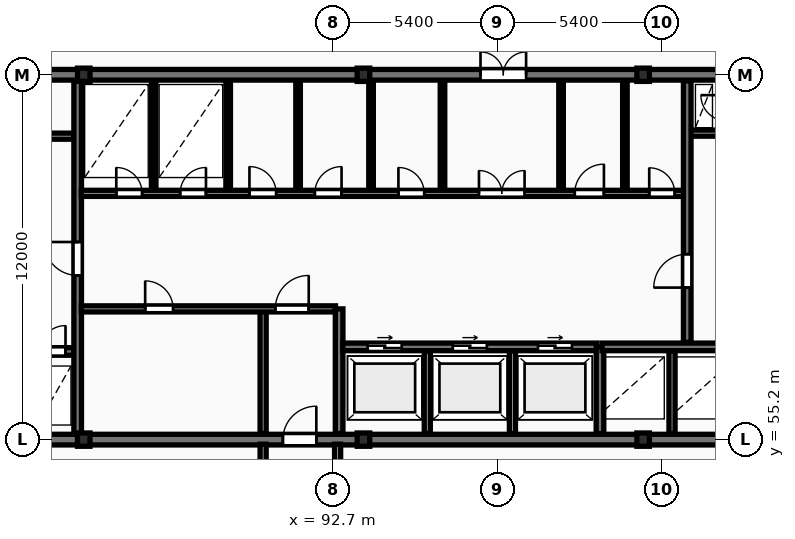
"""IFC4 building model, lengths in metres.
Left out: names, types, materials, properties, quantities, classifications, styles, units other than length and angle.
Written with IfcOpenShell. Run it as: python <this file> out.ifc"""

import sys

from ifc_helpers import new_model, si_unit, direction, frame, frame_2d, origin, origin_2d, place, context, subcontext, project, spatial, rectangle, i_section, extrude, element, fill, save


model = new_model("IFC4")
c1 = context("Model", 3, precision=1e-05, world=origin(), true_north=direction((0.0, 1.0)))
c2 = subcontext(c1, "Body", "Model", "MODEL_VIEW")
j1 = project(units=[si_unit("LENGTHUNIT", "METRE"), si_unit("PLANEANGLEUNIT", "RADIAN")], contexts=[c1])
p1 = place(None, origin())
s1 = spatial("IfcSite", under=j1, at=p1, CompositionType="ELEMENT")
p2 = place(p1, origin())
s2 = spatial("IfcBuilding", under=s1, at=p2, CompositionType="ELEMENT")
p3 = place(p2, frame((0.0, 0.0, 150.1)))
s3 = spatial("IfcBuildingStorey", under=s2, at=p3, CompositionType="ELEMENT", Elevation=150.1)
for number, where, z_axis, x_axis in (
    (1, (84.5, 55.2, 0.0), (0.0, 0.0, 1.0), (1.0, 0.0, 0.0)),
    (2, (84.5, 67.2, 0.0), (0.0, 0.0, 1.0), (1.0, 0.0, 0.0)),
    (3, (93.7, 55.2, 0.0), (0.0, 0.0, 1.0), (1.0, 0.0, 0.0)),
    (4, (93.7, 67.2, 0.0), (0.0, 0.0, 1.0), (1.0, 0.0, 0.0)),
    (5, (102.9, 55.2, 0.0), (0.0, 0.0, 1.0), (1.0, 0.0, 0.0)),
    (6, (102.9, 67.2, 0.0), (0.0, 0.0, 1.0), (1.0, 0.0, 0.0)),
):
    element("IfcColumn", number, at=place(p3, frame(where, z_axis=z_axis, x_axis=x_axis)), inside=s3, PredefinedType="COLUMN", context=c2, shape_type="SweptSolid", body=[
        extrude(i_section(OverallWidth=0.412, OverallDepth=0.437, WebThickness=0.036, FlangeThickness=0.052, FilletRadius=0.015, at=origin_2d()), origin(), (0.0, 0.0, 1.0), 3.6),
    ])
p4 = place(p3, frame((75.95, 55.2, 0.0), z_axis=(0.0, 0.0, 1.0), x_axis=(1.0, 0.0, 0.0)))
e7 = element("IfcWall", 7, at=p4, inside=s3, PredefinedType="SHEAR", context=c2, shape_type="SweptSolid", body=[
    extrude(rectangle(XDim=36.3, YDim=0.35, at=frame_2d((18.15, 0.0))), origin(), (0.0, 0.0, 1.0), 3.6),
])
p5 = place(p4, frame((15.1, 0.0, 0.0)))
e8 = element("IfcOpeningElement", 8, at=p5, cuts=e7, PredefinedType="OPENING", context=c2, shape_type="SweptSolid", body=[
    extrude(rectangle(XDim=1.1, YDim=2.1, at=frame_2d((0.55, 1.05))), frame((0.0, 0.185, 0.0), z_axis=(0.0, -1.0, 0.0), x_axis=(1.0, 0.0, 0.0)), (0.0, 0.0, 1.0), 0.37),
])
p6 = place(p3, frame((75.95, 67.2, 0.0), z_axis=(0.0, 0.0, 1.0), x_axis=(1.0, 0.0, 0.0)))
e9 = element("IfcWall", 9, at=p6, inside=s3, PredefinedType="SHEAR", context=c2, shape_type="SweptSolid", body=[
    extrude(rectangle(XDim=36.3, YDim=0.35, at=frame_2d((18.15, 0.0))), origin(), (0.0, 0.0, 1.0), 3.6),
])
p7 = place(p6, frame((5.25, 0.0, 0.0)))
e10 = element("IfcOpeningElement", 10, at=p7, cuts=e9, PredefinedType="OPENING", context=c2, shape_type="SweptSolid", body=[
    extrude(rectangle(XDim=1.0, YDim=2.15, at=frame_2d((0.5, 1.075))), frame((0.0, 0.185, 0.0), z_axis=(0.0, -1.0, 0.0), x_axis=(1.0, 0.0, 0.0)), (0.0, 0.0, 1.0), 0.37),
])
p8 = place(p6, frame((21.6, 0.0, 0.0)))
e11 = element("IfcOpeningElement", 11, at=p8, cuts=e9, PredefinedType="OPENING", context=c2, shape_type="SweptSolid", body=[
    extrude(rectangle(XDim=1.5, YDim=2.2, at=frame_2d((0.75, 1.1))), frame((0.0, 0.185, 0.0), z_axis=(0.0, -1.0, 0.0), x_axis=(1.0, 0.0, 0.0)), (0.0, 0.0, 1.0), 0.37),
])
p9 = place(p6, frame((30.45, 0.0, 0.0)))
e12 = element("IfcOpeningElement", 12, at=p9, cuts=e9, PredefinedType="OPENING", context=c2, shape_type="SweptSolid", body=[
    extrude(rectangle(XDim=1.0, YDim=2.15, at=frame_2d((0.5, 1.075))), frame((0.0, 0.185, 0.0), z_axis=(0.0, -1.0, 0.0), x_axis=(1.0, 0.0, 0.0)), (0.0, 0.0, 1.0), 0.37),
])
p10 = place(p3, frame((79.79, 58.1, 0.0), z_axis=(0.0, 0.0, 1.0), x_axis=(1.0, 0.0, 0.0)))
e13 = element("IfcWall", 13, at=p10, inside=s3, PredefinedType="SHEAR", context=c2, shape_type="SweptSolid", body=[
    extrude(rectangle(XDim=4.39, YDim=0.25, at=frame_2d((2.195, 0.0))), origin(), (0.0, 0.0, 1.0), 3.6),
])
p11 = place(p10, frame((1.05, 0.0, 0.0)))
e14 = element("IfcOpeningElement", 14, at=p11, cuts=e13, PredefinedType="OPENING", context=c2, shape_type="SweptSolid", body=[
    extrude(rectangle(XDim=1.12, YDim=2.12, at=frame_2d((0.56, 1.06))), frame((0.0, 0.135, 0.0), z_axis=(0.0, -1.0, 0.0), x_axis=(1.0, 0.0, 0.0)), (0.0, 0.0, 1.0), 0.27),
])
p12 = place(p10, frame((3.26, 0.0, 0.0)))
e15 = element("IfcOpeningElement", 15, at=p12, cuts=e13, PredefinedType="OPENING", context=c2, shape_type="SweptSolid", body=[
    extrude(rectangle(XDim=0.85, YDim=2.05, at=frame_2d((0.425, 1.025))), frame((0.0, 0.135, 0.0), z_axis=(0.0, -1.0, 0.0), x_axis=(1.0, 0.0, 0.0)), (0.0, 0.0, 1.0), 0.27),
])
p13 = place(p3, frame((79.79, 65.18, 0.0), z_axis=(0.0, 0.0, 1.0), x_axis=(1.0, 0.0, 0.0)))
e16 = element("IfcWall", 16, at=p13, inside=s3, PredefinedType="PARTITIONING", context=c2, shape_type="SweptSolid", body=[
    extrude(rectangle(XDim=4.39, YDim=0.2, at=frame_2d((2.195, 0.0))), origin(), (0.0, 0.0, 1.0), 3.31),
])
p14 = place(p13, frame((1.5, 0.0, 0.0)))
e17 = element("IfcOpeningElement", 17, at=p14, cuts=e16, PredefinedType="OPENING", context=c2, shape_type="SweptSolid", body=[
    extrude(rectangle(XDim=1.1, YDim=2.1, at=frame_2d((0.55, 1.05))), frame((0.0, 0.11, 0.0), z_axis=(0.0, -1.0, 0.0), x_axis=(1.0, 0.0, 0.0)), (0.0, 0.0, 1.0), 0.22),
])
p15 = place(p3, frame((84.3, 55.4, 0.0), z_axis=(0.0, 0.0, 1.0), x_axis=(0.0, 1.0, 0.0)))
e18 = element("IfcWall", 18, at=p15, inside=s3, PredefinedType="SHEAR", context=c2, shape_type="SweptSolid", body=[
    extrude(rectangle(XDim=11.6, YDim=0.25, at=frame_2d((5.8, 0.0))), origin(), (0.0, 0.0, 1.0), 3.6),
])
p16 = place(p15, frame((5.2, 0.0, 0.0)))
e19 = element("IfcOpeningElement", 19, at=p16, cuts=e18, PredefinedType="OPENING", context=c2, shape_type="SweptSolid", body=[
    extrude(rectangle(XDim=1.1, YDim=2.1, at=frame_2d((0.55, 1.05))), frame((0.0, 0.135, 0.0), z_axis=(0.0, -1.0, 0.0), x_axis=(1.0, 0.0, 0.0)), (0.0, 0.0, 1.0), 0.27),
])
p17 = place(p3, frame((90.4, 55.4, 0.0), z_axis=(0.0, 0.0, 1.0), x_axis=(0.0, 1.0, 0.0)))
e20 = element("IfcWall", 20, at=p17, inside=s3, PredefinedType="PARTITIONING", context=c2, shape_type="SweptSolid", body=[
    extrude(rectangle(XDim=4.1, YDim=0.2, at=frame_2d((2.05, 0.0))), origin(), (0.0, 0.0, 1.0), 3.31),
])
p18 = place(p3, frame((84.42, 59.5, 0.0), z_axis=(0.0, 0.0, 1.0), x_axis=(1.0, 0.0, 0.0)))
e21 = element("IfcWall", 21, at=p18, inside=s3, PredefinedType="PARTITIONING", context=c2, shape_type="SweptSolid", body=[
    extrude(rectangle(XDim=8.36, YDim=0.2, at=frame_2d((4.18, 0.0))), origin(), (0.0, 0.0, 1.0), 3.31),
])
p19 = place(p18, frame((2.1, 0.0, 0.0)))
e22 = element("IfcOpeningElement", 22, at=p19, cuts=e21, PredefinedType="OPENING", context=c2, shape_type="SweptSolid", body=[
    extrude(rectangle(XDim=0.92, YDim=2.08, at=frame_2d((0.46, 1.04))), frame((0.0, 0.11, 0.0), z_axis=(0.0, -1.0, 0.0), x_axis=(1.0, 0.0, 0.0)), (0.0, 0.0, 1.0), 0.22),
])
p20 = place(p18, frame((6.38, 0.0, 0.0)))
e23 = element("IfcOpeningElement", 23, at=p20, cuts=e21, PredefinedType="OPENING", context=c2, shape_type="SweptSolid", body=[
    extrude(rectangle(XDim=1.1, YDim=2.1, at=frame_2d((0.55, 1.05))), frame((0.0, 0.11, 0.0), z_axis=(0.0, -1.0, 0.0), x_axis=(1.0, 0.0, 0.0)), (0.0, 0.0, 1.0), 0.22),
])
p21 = place(p3, frame((92.9, 55.4, 0.0), z_axis=(0.0, 0.0, 1.0), x_axis=(0.0, 1.0, 0.0)))
e24 = element("IfcWall", 24, at=p21, inside=s3, PredefinedType="SHEAR", context=c2, shape_type="SweptSolid", body=[
    extrude(rectangle(XDim=4.1, YDim=0.25, at=frame_2d((2.05, 0.0))), origin(), (0.0, 0.0, 1.0), 3.6),
])
for number, where, z_axis, x_axis in (
    (25, (95.8, 55.4, 0.0), (0.0, 0.0, 1.0), (0.0, 1.0, 0.0)),
    (26, (98.6, 55.4, 0.0), (0.0, 0.0, 1.0), (0.0, 1.0, 0.0)),
):
    element("IfcWall", number, at=place(p3, frame(where, z_axis=z_axis, x_axis=x_axis)), inside=s3, PredefinedType="PARTITIONING", context=c2, shape_type="SweptSolid", body=[
        extrude(rectangle(XDim=2.72, YDim=0.2, at=frame_2d((1.36, 0.0))), origin(), (0.0, 0.0, 1.0), 3.31),
    ])
p22 = place(p3, frame((93.02, 58.25, 0.0), z_axis=(0.0, 0.0, 1.0), x_axis=(1.0, 0.0, 0.0)))
e27 = element("IfcWall", 27, at=p22, inside=s3, PredefinedType="SHEAR", context=c2, shape_type="SweptSolid", body=[
    extrude(rectangle(XDim=8.36, YDim=0.25, at=frame_2d((4.18, 0.0))), origin(), (0.0, 0.0, 1.0), 3.6),
])
p23 = place(p22, frame((0.82, 0.0, 0.0)))
e28 = element("IfcOpeningElement", 28, at=p23, cuts=e27, PredefinedType="OPENING", context=c2, shape_type="SweptSolid", body=[
    extrude(rectangle(XDim=1.12, YDim=2.12, at=frame_2d((0.56, 1.06))), frame((0.0, 0.135, 0.0), z_axis=(0.0, -1.0, 0.0), x_axis=(1.0, 0.0, 0.0)), (0.0, 0.0, 1.0), 0.27),
])
p24 = place(p22, frame((3.62, 0.0, 0.0)))
e29 = element("IfcOpeningElement", 29, at=p24, cuts=e27, PredefinedType="OPENING", context=c2, shape_type="SweptSolid", body=[
    extrude(rectangle(XDim=1.12, YDim=2.12, at=frame_2d((0.56, 1.06))), frame((0.0, 0.135, 0.0), z_axis=(0.0, -1.0, 0.0), x_axis=(1.0, 0.0, 0.0)), (0.0, 0.0, 1.0), 0.27),
])
p25 = place(p22, frame((6.42, 0.0, 0.0)))
e30 = element("IfcOpeningElement", 30, at=p25, cuts=e27, PredefinedType="OPENING", context=c2, shape_type="SweptSolid", body=[
    extrude(rectangle(XDim=1.12, YDim=2.12, at=frame_2d((0.56, 1.06))), frame((0.0, 0.135, 0.0), z_axis=(0.0, -1.0, 0.0), x_axis=(1.0, 0.0, 0.0)), (0.0, 0.0, 1.0), 0.27),
])
p26 = place(p3, frame((101.48, 55.4, 0.0), z_axis=(0.0, 0.0, 1.0), x_axis=(0.0, 1.0, 0.0)))
e31 = element("IfcWall", 31, at=p26, inside=s3, PredefinedType="SHEAR", context=c2, shape_type="SweptSolid", body=[
    extrude(rectangle(XDim=2.85, YDim=0.25, at=frame_2d((1.425, 0.0))), origin(), (0.0, 0.0, 1.0), 3.6),
])
p27 = place(p3, frame((103.85, 55.4, 0.0), z_axis=(0.0, 0.0, 1.0), x_axis=(0.0, 1.0, 0.0)))
e32 = element("IfcWall", 32, at=p27, inside=s3, PredefinedType="PARTITIONING", context=c2, shape_type="SweptSolid", body=[
    extrude(rectangle(XDim=2.72, YDim=0.2, at=frame_2d((1.36, 0.0))), origin(), (0.0, 0.0, 1.0), 3.31),
])
p28 = place(p3, frame((101.55, 58.25, 0.0), z_axis=(0.0, 0.0, 1.0), x_axis=(1.0, 0.0, 0.0)))
e33 = element("IfcWall", 33, at=p28, inside=s3, PredefinedType="SHEAR", context=c2, shape_type="SweptSolid", body=[
    extrude(rectangle(XDim=4.6, YDim=0.25, at=frame_2d((2.3, 0.0))), origin(), (0.0, 0.0, 1.0), 3.6),
])
for number, where, z_axis, x_axis in (
    (34, (86.8, 63.4, 0.0), (0.0, 0.0, 1.0), (0.0, 1.0, 0.0)),
    (35, (89.25, 63.4, 0.0), (0.0, 0.0, 1.0), (0.0, 1.0, 0.0)),
    (36, (91.55, 63.4, 0.0), (0.0, 0.0, 1.0), (0.0, 1.0, 0.0)),
):
    element("IfcWall", number, at=place(p3, frame(where, z_axis=z_axis, x_axis=x_axis)), inside=s3, PredefinedType="PARTITIONING", context=c2, shape_type="SweptSolid", body=[
        extrude(rectangle(XDim=3.6, YDim=0.15, at=frame_2d((1.8, 0.0))), origin(), (0.0, 0.0, 1.0), 3.31),
    ])
p29 = place(p3, frame((93.95, 63.4, 0.0), z_axis=(0.0, 0.0, 1.0), x_axis=(0.0, 1.0, 0.0)))
e37 = element("IfcWall", 37, at=p29, inside=s3, PredefinedType="PARTITIONING", context=c2, shape_type="SweptSolid", body=[
    extrude(rectangle(XDim=3.6, YDim=0.15, at=frame_2d((1.8, 0.0))), origin(), (0.0, 0.0, 1.0), 2.617),
])
for number, where, z_axis, x_axis in (
    (38, (102.3, 63.4, 0.0), (0.0, 0.0, 1.0), (0.0, 1.0, 0.0)),
    (39, (96.3, 63.4, 0.0), (0.0, 0.0, 1.0), (0.0, 1.0, 0.0)),
    (40, (100.2, 63.4, 0.0), (0.0, 0.0, 1.0), (0.0, 1.0, 0.0)),
):
    element("IfcWall", number, at=place(p3, frame(where, z_axis=z_axis, x_axis=x_axis)), inside=s3, PredefinedType="PARTITIONING", context=c2, shape_type="SweptSolid", body=[
        extrude(rectangle(XDim=3.6, YDim=0.15, at=frame_2d((1.8, 0.0))), origin(), (0.0, 0.0, 1.0), 3.31),
    ])
p30 = place(p3, frame((84.42, 63.3, 0.0), z_axis=(0.0, 0.0, 1.0), x_axis=(1.0, 0.0, 0.0)))
e41 = element("IfcWall", 41, at=p30, inside=s3, PredefinedType="PARTITIONING", context=c2, shape_type="SweptSolid", body=[
    extrude(rectangle(XDim=19.83, YDim=0.2, at=frame_2d((9.915, 0.0))), origin(), (0.0, 0.0, 1.0), 3.31),
])
p31 = place(p30, frame((1.15, 0.0, 0.0)))
e42 = element("IfcOpeningElement", 42, at=p31, cuts=e41, PredefinedType="OPENING", context=c2, shape_type="SweptSolid", body=[
    extrude(rectangle(XDim=0.85, YDim=2.05, at=frame_2d((0.425, 1.025))), frame((0.0, 0.11, 0.0), z_axis=(0.0, -1.0, 0.0), x_axis=(1.0, 0.0, 0.0)), (0.0, 0.0, 1.0), 0.22),
])
p32 = place(p30, frame((3.25, 0.0, 0.0)))
e43 = element("IfcOpeningElement", 43, at=p32, cuts=e41, PredefinedType="OPENING", context=c2, shape_type="SweptSolid", body=[
    extrude(rectangle(XDim=0.85, YDim=2.05, at=frame_2d((0.425, 1.025))), frame((0.0, 0.11, 0.0), z_axis=(0.0, -1.0, 0.0), x_axis=(1.0, 0.0, 0.0)), (0.0, 0.0, 1.0), 0.22),
])
p33 = place(p30, frame((13.08, 0.0, 0.0)))
e44 = element("IfcOpeningElement", 44, at=p33, cuts=e41, PredefinedType="OPENING", context=c2, shape_type="SweptSolid", body=[
    extrude(rectangle(XDim=1.5, YDim=2.2, at=frame_2d((0.75, 1.1))), frame((0.0, 0.11, 0.0), z_axis=(0.0, -1.0, 0.0), x_axis=(1.0, 0.0, 0.0)), (0.0, 0.0, 1.0), 0.22),
])
p34 = place(p30, frame((5.53, 0.0, 0.0)))
e45 = element("IfcOpeningElement", 45, at=p34, cuts=e41, PredefinedType="OPENING", context=c2, shape_type="SweptSolid", body=[
    extrude(rectangle(XDim=0.88, YDim=2.06, at=frame_2d((0.44, 1.03))), frame((0.0, 0.11, 0.0), z_axis=(0.0, -1.0, 0.0), x_axis=(1.0, 0.0, 0.0)), (0.0, 0.0, 1.0), 0.22),
])
p35 = place(p30, frame((7.68, 0.0, 0.0)))
e46 = element("IfcOpeningElement", 46, at=p35, cuts=e41, PredefinedType="OPENING", context=c2, shape_type="SweptSolid", body=[
    extrude(rectangle(XDim=0.88, YDim=2.06, at=frame_2d((0.44, 1.03))), frame((0.0, 0.11, 0.0), z_axis=(0.0, -1.0, 0.0), x_axis=(1.0, 0.0, 0.0)), (0.0, 0.0, 1.0), 0.22),
])
p36 = place(p30, frame((10.43, 0.0, 0.0)))
e47 = element("IfcOpeningElement", 47, at=p36, cuts=e41, PredefinedType="OPENING", context=c2, shape_type="SweptSolid", body=[
    extrude(rectangle(XDim=0.85, YDim=2.05, at=frame_2d((0.425, 1.025))), frame((0.0, 0.11, 0.0), z_axis=(0.0, -1.0, 0.0), x_axis=(1.0, 0.0, 0.0)), (0.0, 0.0, 1.0), 0.22),
])
p37 = place(p30, frame((16.23, 0.0, 0.0)))
e48 = element("IfcOpeningElement", 48, at=p37, cuts=e41, PredefinedType="OPENING", context=c2, shape_type="SweptSolid", body=[
    extrude(rectangle(XDim=0.96, YDim=2.1, at=frame_2d((0.48, 1.05))), frame((0.0, 0.11, 0.0), z_axis=(0.0, -1.0, 0.0), x_axis=(1.0, 0.0, 0.0)), (0.0, 0.0, 1.0), 0.22),
])
p38 = place(p30, frame((18.68, 0.0, 0.0)))
e49 = element("IfcOpeningElement", 49, at=p38, cuts=e41, PredefinedType="OPENING", context=c2, shape_type="SweptSolid", body=[
    extrude(rectangle(XDim=0.84, YDim=2.04, at=frame_2d((0.42, 1.02))), frame((0.0, 0.11, 0.0), z_axis=(0.0, -1.0, 0.0), x_axis=(1.0, 0.0, 0.0)), (0.0, 0.0, 1.0), 0.22),
])
p39 = place(p3, frame((104.45, 65.28, 0.0), z_axis=(0.0, 0.0, 1.0), x_axis=(1.0, 0.0, 0.0)))
e50 = element("IfcWall", 50, at=p39, inside=s3, PredefinedType="PARTITIONING", context=c2, shape_type="SweptSolid", body=[
    extrude(rectangle(XDim=1.2, YDim=0.2, at=frame_2d((0.6, 0.0))), origin(), (0.0, 0.0, 1.0), 3.31),
])
p40 = place(p3, frame((104.35, 58.4, 0.0), z_axis=(0.0, 0.0, 1.0), x_axis=(0.0, 1.0, 0.0)))
e51 = element("IfcWall", 51, at=p40, inside=s3, PredefinedType="SHEAR", context=c2, shape_type="SweptSolid", body=[
    extrude(rectangle(XDim=8.6, YDim=0.25, at=frame_2d((4.3, 0.0))), origin(), (0.0, 0.0, 1.0), 3.6),
])
p41 = place(p40, frame((1.8, 0.0, 0.0)))
e52 = element("IfcOpeningElement", 52, at=p41, cuts=e51, PredefinedType="OPENING", context=c2, shape_type="SweptSolid", body=[
    extrude(rectangle(XDim=1.1, YDim=2.1, at=frame_2d((0.55, 1.05))), frame((0.0, 0.135, 0.0), z_axis=(0.0, -1.0, 0.0), x_axis=(1.0, 0.0, 0.0)), (0.0, 0.0, 1.0), 0.27),
])
for number, where, z_axis, x_axis in (
    (53, (90.4, 50.85, 0.0), (0.0, 0.0, 1.0), (0.0, 1.0, 0.0)),
    (54, (92.85, 50.85, 0.0), (0.0, 0.0, 1.0), (0.0, 1.0, 0.0)),
):
    element("IfcWall", number, at=place(p3, frame(where, z_axis=z_axis, x_axis=x_axis)), inside=s3, PredefinedType="PARTITIONING", context=c2, shape_type="SweptSolid", body=[
        extrude(rectangle(XDim=4.2, YDim=0.2, at=frame_2d((2.1, 0.0))), origin(), (0.0, 0.0, 1.0), 3.31),
    ])
p42 = place(p5, origin())
e55 = element("IfcDoor", 55, at=p42, inside=s3, OperationType="SINGLE_SWING_RIGHT", PredefinedType="DOOR", context=c2, shape_type="SweptSolid", body=[
    extrude(rectangle(XDim=1.1, YDim=2.1, at=frame_2d((0.55, 1.05))), frame((0.0, 0.025, 0.0), z_axis=(0.0, -1.0, 0.0), x_axis=(1.0, 0.0, 0.0)), (0.0, 0.0, 1.0), 0.05),
])
fill(e8, e55)
p43 = place(p8, origin())
e56 = element("IfcDoor", 56, at=p43, inside=s3, OperationType="DOUBLE_DOOR_SINGLE_SWING", PredefinedType="DOOR", context=c2, shape_type="SweptSolid", body=[
    extrude(rectangle(XDim=1.5, YDim=2.2, at=frame_2d((0.75, 1.1))), frame((0.0, 0.025, 0.0), z_axis=(0.0, -1.0, 0.0), x_axis=(1.0, 0.0, 0.0)), (0.0, 0.0, 1.0), 0.05),
])
fill(e11, e56)
p44 = place(p12, origin())
e57 = element("IfcDoor", 57, at=p44, inside=s3, OperationType="SINGLE_SWING_RIGHT", PredefinedType="DOOR", context=c2, shape_type="SweptSolid", body=[
    extrude(rectangle(XDim=0.85, YDim=2.05, at=frame_2d((0.425, 1.025))), frame((0.0, 0.025, 0.0), z_axis=(0.0, -1.0, 0.0), x_axis=(1.0, 0.0, 0.0)), (0.0, 0.0, 1.0), 0.05),
])
fill(e15, e57)
p45 = place(p16, origin())
e58 = element("IfcDoor", 58, at=p45, inside=s3, OperationType="SINGLE_SWING_RIGHT", PredefinedType="DOOR", context=c2, shape_type="SweptSolid", body=[
    extrude(rectangle(XDim=1.1, YDim=2.1, at=frame_2d((0.55, 1.05))), frame((0.0, 0.025, 0.0), z_axis=(0.0, -1.0, 0.0), x_axis=(1.0, 0.0, 0.0)), (0.0, 0.0, 1.0), 0.05),
])
fill(e19, e58)
p46 = place(p19, origin())
e59 = element("IfcDoor", 59, at=p46, inside=s3, OperationType="SINGLE_SWING_LEFT", PredefinedType="DOOR", context=c2, shape_type="SweptSolid", body=[
    extrude(rectangle(XDim=0.92, YDim=2.08, at=frame_2d((0.46, 1.04))), frame((0.0, 0.025, 0.0), z_axis=(0.0, -1.0, 0.0), x_axis=(1.0, 0.0, 0.0)), (0.0, 0.0, 1.0), 0.05),
])
fill(e22, e59)
p47 = place(p20, origin())
e60 = element("IfcDoor", 60, at=p47, inside=s3, OperationType="SINGLE_SWING_RIGHT", PredefinedType="DOOR", context=c2, shape_type="SweptSolid", body=[
    extrude(rectangle(XDim=1.1, YDim=2.1, at=frame_2d((0.55, 1.05))), frame((0.0, 0.025, 0.0), z_axis=(0.0, -1.0, 0.0), x_axis=(1.0, 0.0, 0.0)), (0.0, 0.0, 1.0), 0.05),
])
fill(e23, e60)
p48 = place(p23, origin())
e61 = element("IfcDoor", 61, at=p48, inside=s3, OperationType="SLIDING_TO_RIGHT", PredefinedType="DOOR", context=c2, shape_type="SweptSolid", body=[
    extrude(rectangle(XDim=1.12, YDim=2.12, at=frame_2d((0.56, 1.06))), frame((0.0, 0.025, 0.0), z_axis=(0.0, -1.0, 0.0), x_axis=(1.0, 0.0, 0.0)), (0.0, 0.0, 1.0), 0.05),
])
fill(e28, e61)
p49 = place(p24, origin())
e62 = element("IfcDoor", 62, at=p49, inside=s3, OperationType="SLIDING_TO_RIGHT", PredefinedType="DOOR", context=c2, shape_type="SweptSolid", body=[
    extrude(rectangle(XDim=1.12, YDim=2.12, at=frame_2d((0.56, 1.06))), frame((0.0, 0.025, 0.0), z_axis=(0.0, -1.0, 0.0), x_axis=(1.0, 0.0, 0.0)), (0.0, 0.0, 1.0), 0.05),
])
fill(e29, e62)
p50 = place(p25, origin())
e63 = element("IfcDoor", 63, at=p50, inside=s3, OperationType="SLIDING_TO_RIGHT", PredefinedType="DOOR", context=c2, shape_type="SweptSolid", body=[
    extrude(rectangle(XDim=1.12, YDim=2.12, at=frame_2d((0.56, 1.06))), frame((0.0, 0.025, 0.0), z_axis=(0.0, -1.0, 0.0), x_axis=(1.0, 0.0, 0.0)), (0.0, 0.0, 1.0), 0.05),
])
fill(e30, e63)
p51 = place(p31, origin())
e64 = element("IfcDoor", 64, at=p51, inside=s3, OperationType="SINGLE_SWING_LEFT", PredefinedType="DOOR", context=c2, shape_type="SweptSolid", body=[
    extrude(rectangle(XDim=0.85, YDim=2.05, at=frame_2d((0.425, 1.025))), frame((0.0, 0.025, 0.0), z_axis=(0.0, -1.0, 0.0), x_axis=(1.0, 0.0, 0.0)), (0.0, 0.0, 1.0), 0.05),
])
fill(e42, e64)
p52 = place(p32, origin())
e65 = element("IfcDoor", 65, at=p52, inside=s3, OperationType="SINGLE_SWING_RIGHT", PredefinedType="DOOR", context=c2, shape_type="SweptSolid", body=[
    extrude(rectangle(XDim=0.85, YDim=2.05, at=frame_2d((0.425, 1.025))), frame((0.0, 0.025, 0.0), z_axis=(0.0, -1.0, 0.0), x_axis=(1.0, 0.0, 0.0)), (0.0, 0.0, 1.0), 0.05),
])
fill(e43, e65)
p53 = place(p33, origin())
e66 = element("IfcDoor", 66, at=p53, inside=s3, OperationType="DOUBLE_DOOR_SINGLE_SWING", PredefinedType="DOOR", context=c2, shape_type="SweptSolid", body=[
    extrude(rectangle(XDim=1.5, YDim=2.2, at=frame_2d((0.75, 1.1))), frame((0.0, 0.025, 0.0), z_axis=(0.0, -1.0, 0.0), x_axis=(1.0, 0.0, 0.0)), (0.0, 0.0, 1.0), 0.05),
])
fill(e44, e66)
p54 = place(p34, origin())
e67 = element("IfcDoor", 67, at=p54, inside=s3, OperationType="SINGLE_SWING_LEFT", PredefinedType="DOOR", context=c2, shape_type="SweptSolid", body=[
    extrude(rectangle(XDim=0.88, YDim=2.06, at=frame_2d((0.44, 1.03))), frame((0.0, 0.025, 0.0), z_axis=(0.0, -1.0, 0.0), x_axis=(1.0, 0.0, 0.0)), (0.0, 0.0, 1.0), 0.05),
])
fill(e45, e67)
p55 = place(p35, origin())
e68 = element("IfcDoor", 68, at=p55, inside=s3, OperationType="SINGLE_SWING_RIGHT", PredefinedType="DOOR", context=c2, shape_type="SweptSolid", body=[
    extrude(rectangle(XDim=0.88, YDim=2.06, at=frame_2d((0.44, 1.03))), frame((0.0, 0.025, 0.0), z_axis=(0.0, -1.0, 0.0), x_axis=(1.0, 0.0, 0.0)), (0.0, 0.0, 1.0), 0.05),
])
fill(e46, e68)
p56 = place(p36, origin())
e69 = element("IfcDoor", 69, at=p56, inside=s3, OperationType="SINGLE_SWING_LEFT", PredefinedType="DOOR", context=c2, shape_type="SweptSolid", body=[
    extrude(rectangle(XDim=0.85, YDim=2.05, at=frame_2d((0.425, 1.025))), frame((0.0, 0.025, 0.0), z_axis=(0.0, -1.0, 0.0), x_axis=(1.0, 0.0, 0.0)), (0.0, 0.0, 1.0), 0.05),
])
fill(e47, e69)
p57 = place(p37, origin())
e70 = element("IfcDoor", 70, at=p57, inside=s3, OperationType="SINGLE_SWING_RIGHT", PredefinedType="DOOR", context=c2, shape_type="SweptSolid", body=[
    extrude(rectangle(XDim=0.96, YDim=2.1, at=frame_2d((0.48, 1.05))), frame((0.0, 0.025, 0.0), z_axis=(0.0, -1.0, 0.0), x_axis=(1.0, 0.0, 0.0)), (0.0, 0.0, 1.0), 0.05),
])
fill(e48, e70)
p58 = place(p38, origin())
e71 = element("IfcDoor", 71, at=p58, inside=s3, OperationType="SINGLE_SWING_LEFT", PredefinedType="DOOR", context=c2, shape_type="SweptSolid", body=[
    extrude(rectangle(XDim=0.84, YDim=2.04, at=frame_2d((0.42, 1.02))), frame((0.0, 0.025, 0.0), z_axis=(0.0, -1.0, 0.0), x_axis=(1.0, 0.0, 0.0)), (0.0, 0.0, 1.0), 0.05),
])
fill(e49, e71)
p59 = place(p41, origin())
e72 = element("IfcDoor", 72, at=p59, inside=s3, OperationType="SINGLE_SWING_LEFT", PredefinedType="DOOR", context=c2, shape_type="SweptSolid", body=[
    extrude(rectangle(XDim=1.1, YDim=2.1, at=frame_2d((0.55, 1.05))), frame((0.0, 0.025, 0.0), z_axis=(0.0, -1.0, 0.0), x_axis=(1.0, 0.0, 0.0)), (0.0, 0.0, 1.0), 0.05),
])
fill(e52, e72)
save(model, sys.argv[1])
